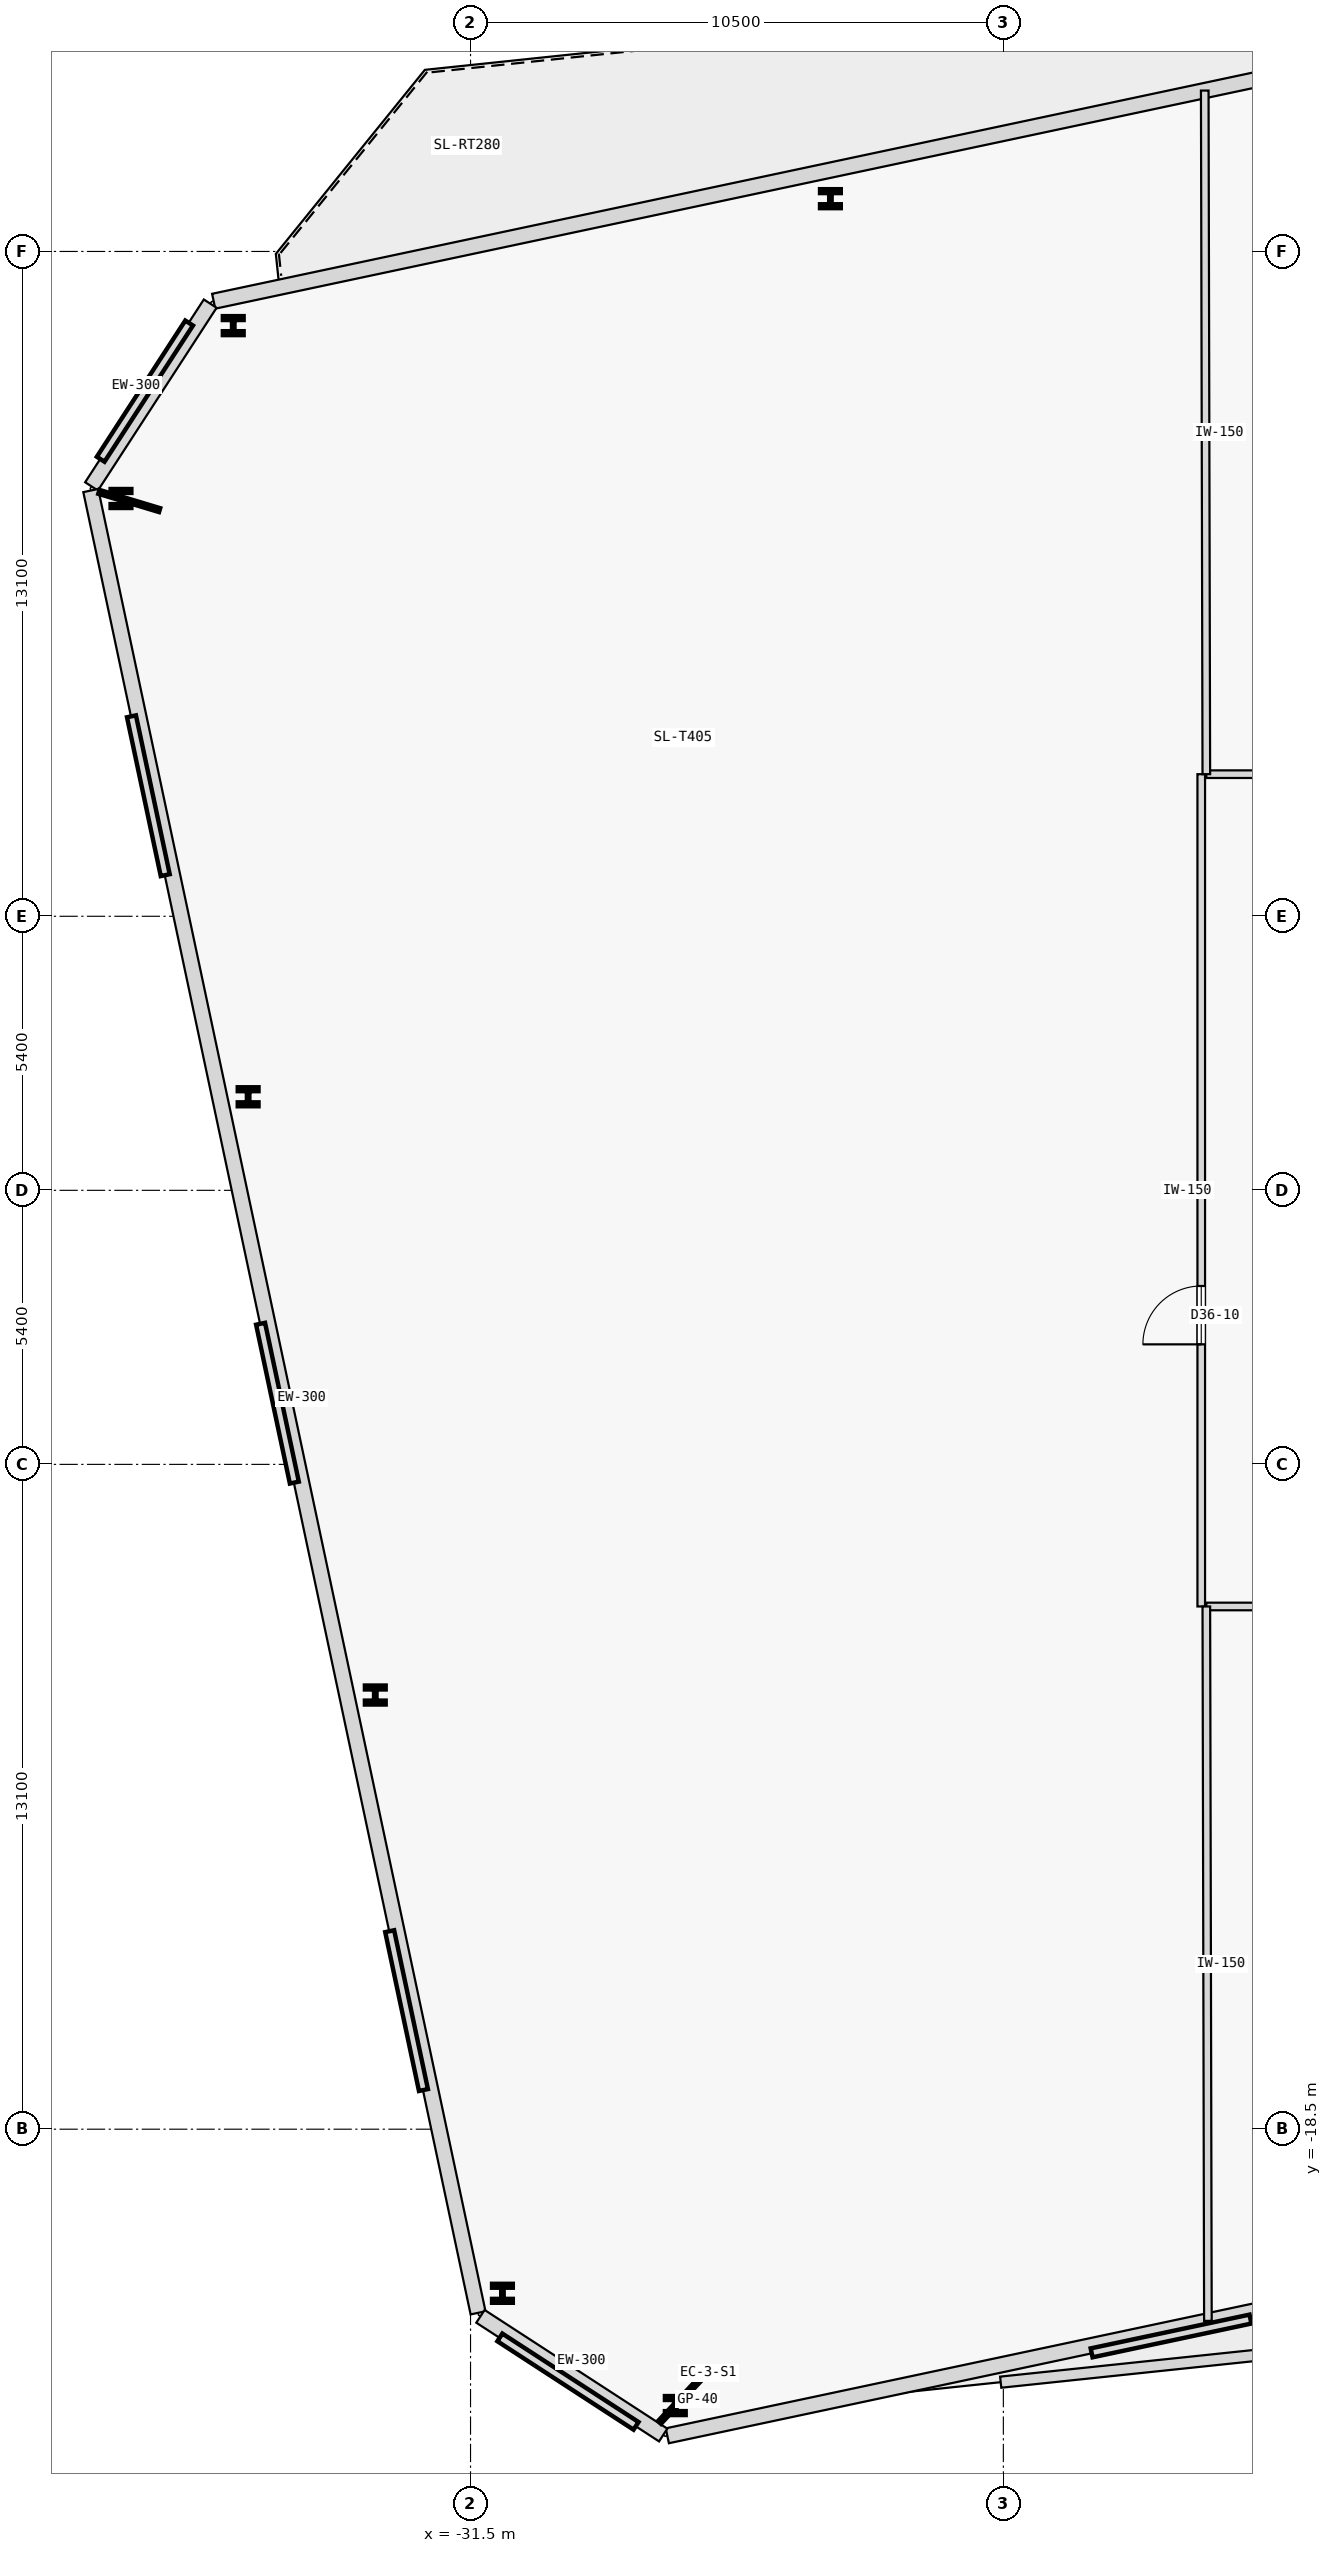
"""IFC4 building model, lengths in metres.
Left out: names, types, materials, properties, quantities, classifications, styles, units other than length and angle.
Written with IfcOpenShell. Run it as: python <this file> out.ifc"""

import sys

from ifc_helpers import new_model, si_unit, direction, frame, frame_2d, origin, origin_2d, place, context, subcontext, project, spatial, rectangle, i_section, extrude, element, fill, save


model = new_model("IFC4")
c1 = context("Model", 3, precision=1e-05, world=origin(), true_north=direction((0.0, 1.0)))
c2 = subcontext(c1, "Body", "Model", "MODEL_VIEW")
j1 = project(units=[si_unit("LENGTHUNIT", "METRE"), si_unit("PLANEANGLEUNIT", "RADIAN")], contexts=[c1])
p1 = place(None, origin())
s1 = spatial("IfcSite", under=j1, at=p1, CompositionType="ELEMENT")
p2 = place(p1, origin())
s2 = spatial("IfcBuilding", under=s1, at=p2, CompositionType="ELEMENT")
p3 = place(p2, frame((0.0, 0.0, 142.9)))
s3 = spatial("IfcBuildingStorey", under=s2, at=p3, CompositionType="ELEMENT", Elevation=142.9)
for number, where, z_axis, x_axis in (
    (1, (-27.465, -23.946, 0.0), (0.0, 0.0, 1.0), (1.0, 0.0, 0.0)),
    (2, (-24.408, 19.54, 0.0), (0.0, 0.0, 1.0), (1.0, 0.0, 0.0)),
    (3, (-36.176, 17.039, 0.0), (0.0, 0.0, 1.0), (1.0, 0.0, 0.0)),
    (4, (-38.389, 13.632, 0.0), (0.0, 0.0, 1.0), (1.0, 0.0, 0.0)),
    (5, (-35.883, 1.844, 0.0), (0.0, 0.0, 1.0), (1.0, 0.0, 0.0)),
    (6, (-33.377, -9.945, 0.0), (0.0, 0.0, 1.0), (1.0, 0.0, 0.0)),
    (7, (-30.871, -21.733, 0.0), (0.0, 0.0, 1.0), (1.0, 0.0, 0.0)),
):
    element("IfcColumn", number, at=place(p3, frame(where, z_axis=z_axis, x_axis=x_axis)), inside=s3, PredefinedType="COLUMN", context=c2, shape_type="SweptSolid", body=[
        extrude(i_section(OverallWidth=0.409, OverallDepth=0.374, WebThickness=0.048, FlangeThickness=0.077, FilletRadius=0.015, at=origin_2d()), origin(), (0.0, 0.0, 1.0), 4.4),
    ])
p4 = place(p3, frame((-21.052, -23.485, 0.0), z_axis=(0.0, 0.0, 1.0), x_axis=(0.994521672957, 0.104530579345, 0.0)))
e8 = element("IfcWall", 8, at=p4, inside=s3, PredefinedType="PARAPET", context=c2, shape_type="SweptSolid", body=[
    extrude(rectangle(XDim=59.256, YDim=0.22, at=frame_2d((29.628, 0.0))), origin(), (0.0, 0.0, 1.0), 1.2),
])
p5 = place(p3, frame((-27.622, -24.541, 0.0), z_axis=(0.0, 0.0, 1.0), x_axis=(0.978147586603, 0.207911757299, 0.0)))
e9 = element("IfcWall", 9, at=p5, inside=s3, PredefinedType="STANDARD", context=c2, shape_type="SweptSolid", body=[
    extrude(rectangle(XDim=60.71, YDim=0.3, at=frame_2d((30.355, 0.0))), origin(), (0.0, 0.0, 1.0), 4.15),
])
p6 = place(p3, frame((22.822, 30.141, 0.0), z_axis=(0.0, 0.0, 1.0), x_axis=(-0.978147586603, -0.207911757299, 0.0)))
e10 = element("IfcWall", 10, at=p6, inside=s3, PredefinedType="STANDARD", context=c2, shape_type="SweptSolid", body=[
    extrude(rectangle(XDim=60.71, YDim=0.3, at=frame_2d((30.355, 0.0))), origin(), (0.0, 0.0, 1.0), 4.15),
])
p7 = place(p6, frame((33.618, 0.0, 0.0)))
e11 = element("IfcOpeningElement", 11, at=p7, cuts=e10, PredefinedType="OPENING", context=c2, shape_type="SweptSolid", body=[
    extrude(rectangle(XDim=1.1, YDim=2.2, at=frame_2d((0.55, 1.1))), frame((0.0, 0.16, 0.0), z_axis=(0.0, -1.0, 0.0), x_axis=(1.0, 0.0, 0.0)), (0.0, 0.0, 1.0), 0.32),
])
p8 = place(p3, frame((-36.63, 17.472, 0.0), z_axis=(0.0, 0.0, 1.0), x_axis=(-0.544622582474, -0.838681252121, 0.0)))
e12 = element("IfcWall", 12, at=p8, inside=s3, PredefinedType="STANDARD", context=c2, shape_type="SweptSolid", body=[
    extrude(rectangle(XDim=4.294, YDim=0.3, at=frame_2d((2.147, 0.0))), origin(), (0.0, 0.0, 1.0), 4.15),
])
p9 = place(p3, frame((-38.984, 13.789, 0.0), z_axis=(0.0, 0.0, 1.0), x_axis=(0.207909183918, -0.978148133589, 0.0)))
e13 = element("IfcWall", 13, at=p9, inside=s3, PredefinedType="STANDARD", context=c2, shape_type="SweptSolid", body=[
    extrude(rectangle(XDim=36.71, YDim=0.3, at=frame_2d((18.355, 0.0))), origin(), (0.0, 0.0, 1.0), 4.15),
])
p10 = place(p3, frame((-31.305, -22.188, 0.0), z_axis=(0.0, 0.0, 1.0), x_axis=(0.838681252121, -0.544622582474, 0.0)))
e14 = element("IfcWall", 14, at=p10, inside=s3, PredefinedType="STANDARD", context=c2, shape_type="SweptSolid", body=[
    extrude(rectangle(XDim=4.294, YDim=0.3, at=frame_2d((2.147, 0.0))), origin(), (0.0, 0.0, 1.0), 4.15),
])
p11 = place(p3, frame((-17.0, 8.2, 0.0), z_axis=(0.0, 0.0, 1.0), x_axis=(1.0, 0.0, 0.0)))
e15 = element("IfcWall", 15, at=p11, inside=s3, PredefinedType="PARTITIONING", context=c2, shape_type="SweptSolid", body=[
    extrude(rectangle(XDim=12.8, YDim=0.15, at=frame_2d((6.4, 0.0))), origin(), (0.0, 0.0, 1.0), 4.15),
])
p12 = place(p11, frame((5.825, 0.0, 0.0)))
e16 = element("IfcOpeningElement", 16, at=p12, cuts=e15, PredefinedType="OPENING", context=c2, shape_type="SweptSolid", body=[
    extrude(rectangle(XDim=1.15, YDim=2.15, at=frame_2d((0.575, 1.075))), frame((0.0, 0.085, 0.0), z_axis=(0.0, -1.0, 0.0), x_axis=(1.0, 0.0, 0.0)), (0.0, 0.0, 1.0), 0.17),
])
p13 = place(p3, frame((-17.0, -8.2, 0.0), z_axis=(0.0, 0.0, 1.0), x_axis=(1.0, 0.0, 0.0)))
e17 = element("IfcWall", 17, at=p13, inside=s3, PredefinedType="PARTITIONING", context=c2, shape_type="SweptSolid", body=[
    extrude(rectangle(XDim=21.7, YDim=0.15, at=frame_2d((10.85, 0.0))), origin(), (0.0, 0.0, 1.0), 4.15),
])
p14 = place(p13, frame((10.275, 0.0, 0.0)))
e18 = element("IfcOpeningElement", 18, at=p14, cuts=e17, PredefinedType="OPENING", context=c2, shape_type="SweptSolid", body=[
    extrude(rectangle(XDim=1.15, YDim=2.15, at=frame_2d((0.575, 1.075))), frame((0.0, 0.085, 0.0), z_axis=(0.0, -1.0, 0.0), x_axis=(1.0, 0.0, 0.0)), (0.0, 0.0, 1.0), 0.17),
])
p15 = place(p3, frame((-17.1, -8.2, 0.0), z_axis=(0.0, 0.0, 1.0), x_axis=(0.0, 1.0, 0.0)))
e19 = element("IfcWall", 19, at=p15, inside=s3, PredefinedType="PARTITIONING", context=c2, shape_type="SweptSolid", body=[
    extrude(rectangle(XDim=16.4, YDim=0.15, at=frame_2d((8.2, 0.0))), origin(), (0.0, 0.0, 1.0), 4.15),
])
p16 = place(p15, frame((5.165, 0.0, 0.0)))
e20 = element("IfcOpeningElement", 20, at=p16, cuts=e19, PredefinedType="OPENING", context=c2, shape_type="SweptSolid", body=[
    extrude(rectangle(XDim=1.15, YDim=2.15, at=frame_2d((0.575, 1.075))), frame((0.0, 0.085, 0.0), z_axis=(0.0, -1.0, 0.0), x_axis=(1.0, 0.0, 0.0)), (0.0, 0.0, 1.0), 0.17),
])
p17 = place(p3, frame((-17.0, 8.2, 0.0), z_axis=(0.0, 0.0, 1.0), x_axis=(-0.002301761007, 0.999997350945, 0.0)))
e21 = element("IfcWall", 21, at=p17, inside=s3, PredefinedType="PARTITIONING", context=c2, shape_type="SweptSolid", body=[
    extrude(rectangle(XDim=13.47, YDim=0.15, at=frame_2d((6.735, 0.0))), origin(), (0.0, 0.0, 1.0), 4.15),
])
p18 = place(p3, frame((-16.969, -22.277, 0.0), z_axis=(0.0, 0.0, 1.0), x_axis=(-0.002219904346, 0.999997536009, 0.0)))
e22 = element("IfcWall", 22, at=p18, inside=s3, PredefinedType="PARTITIONING", context=c2, shape_type="SweptSolid", body=[
    extrude(rectangle(XDim=14.077, YDim=0.15, at=frame_2d((7.039, 0.0))), origin(), (0.0, 0.0, 1.0), 4.15),
])
p19 = place(p16, origin())
e23 = element("IfcDoor", 23, at=p19, inside=s3, OperationType="SINGLE_SWING_LEFT", PredefinedType="DOOR", context=c2, shape_type="SweptSolid", body=[
    extrude(rectangle(XDim=1.15, YDim=2.15, at=frame_2d((0.575, 1.075))), frame((0.0, 0.025, 0.0), z_axis=(0.0, -1.0, 0.0), x_axis=(1.0, 0.0, 0.0)), (0.0, 0.0, 1.0), 0.05),
])
fill(e20, e23)
save(model, sys.argv[1])
